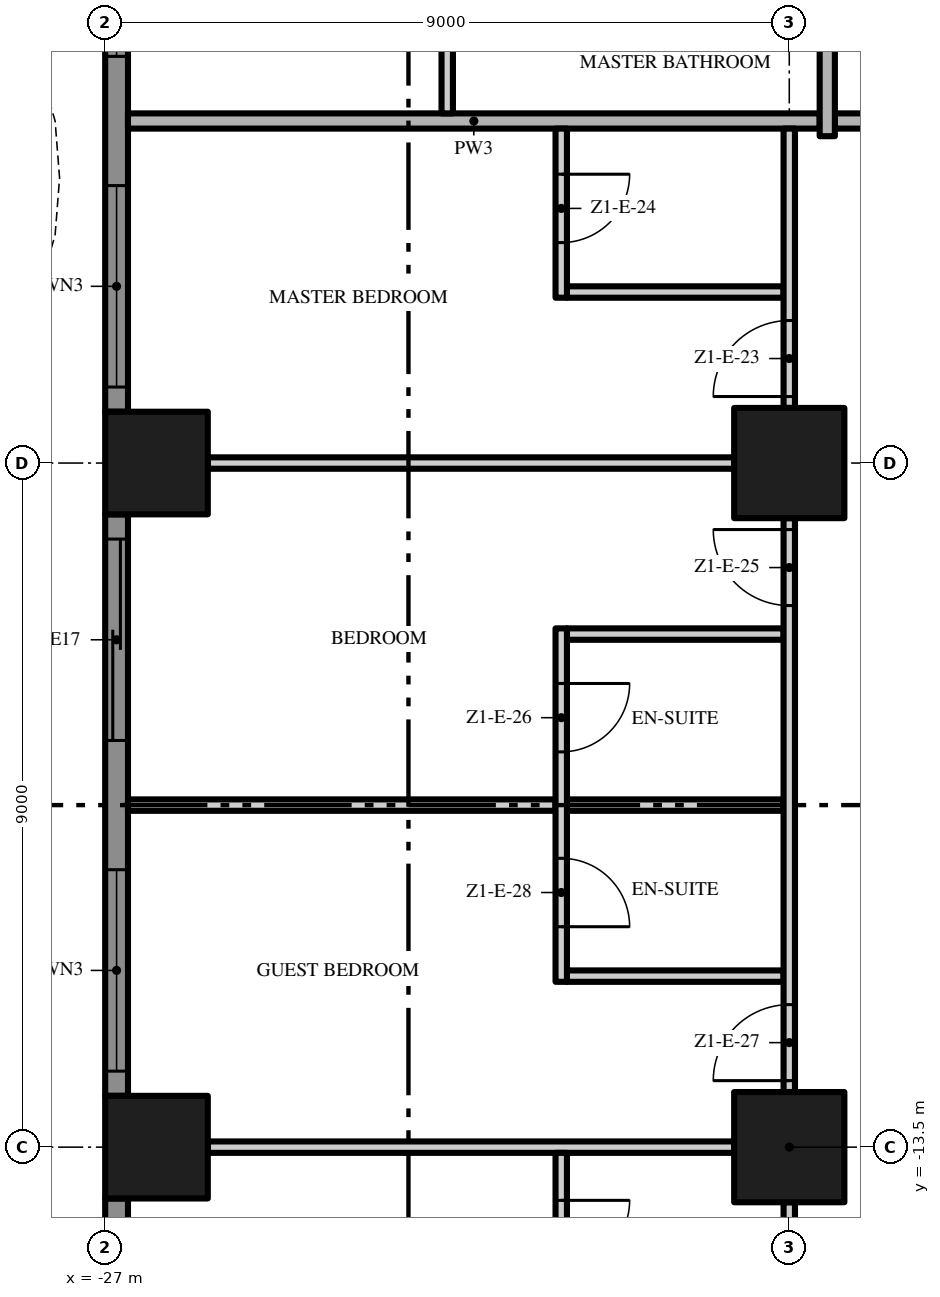
"""IFC4 building model, lengths in metres.
Left out: names, types, materials, properties, quantities, classifications, styles, units other than length and angle.
Written with IfcOpenShell. Run it as: python <this file> out.ifc"""

import sys

from ifc_helpers import new_model, si_unit, direction, frame, frame_2d, origin, origin_2d, place, context, subcontext, project, spatial, polyline, rectangle, outline, extrude, element, fill, save


model = new_model("IFC4")
c1 = context("Model", 3, precision=1e-05, world=origin(), true_north=direction((0.0, 1.0)))
c2 = subcontext(c1, "Body", "Model", "MODEL_VIEW")
j1 = project(units=[si_unit("LENGTHUNIT", "METRE"), si_unit("PLANEANGLEUNIT", "RADIAN")], contexts=[c1])
p1 = place(None, origin())
s1 = spatial("IfcSite", under=j1, at=p1, CompositionType="ELEMENT")
p2 = place(p1, origin())
s2 = spatial("IfcBuilding", under=s1, at=p2, CompositionType="ELEMENT")
p3 = place(p2, frame((0.0, 0.0, 60.6)))
s3 = spatial("IfcBuildingStorey", under=s2, at=p3, CompositionType="ELEMENT", Elevation=60.6)
for number, where, z_axis, x_axis in (
    (1, (-18.0, -13.5, 0.0), (0.0, 0.0, 1.0), (1.0, 0.0, 0.0)),
    (2, (-18.0, -4.5, 0.0), (0.0, 0.0, 1.0), (1.0, 0.0, 0.0)),
):
    element("IfcColumn", number, at=place(p3, frame(where, z_axis=z_axis, x_axis=x_axis)), inside=s3, PredefinedType="COLUMN", context=c2, shape_type="SweptSolid", body=[
        extrude(rectangle(XDim=1.45, YDim=1.45, at=origin_2d()), origin(), (0.0, 0.0, 1.0), 3.5),
    ])
for number, where, z_axis, x_axis in (
    (3, (-26.325, -13.5, 0.0), (0.0, 0.0, 1.0), (1.0, 0.0, 0.0)),
    (4, (-26.325, -4.5, 0.0), (0.0, 0.0, 1.0), (1.0, 0.0, 0.0)),
):
    element("IfcColumn", number, at=place(p3, frame(where, z_axis=z_axis, x_axis=x_axis)), inside=s3, PredefinedType="COLUMN", context=c2, shape_type="SweptSolid", body=[
        extrude(rectangle(XDim=1.35, YDim=1.35, at=origin_2d()), origin(), (0.0, 0.0, 1.0), 3.5),
    ])
p4 = place(p3, frame((-26.85, -3.825, 0.0), z_axis=(0.0, 0.0, 1.0), x_axis=(0.0, 1.0, 0.0)))
e5 = element("IfcWall", 5, at=p4, inside=s3, PredefinedType="SOLIDWALL", context=c2, shape_type="SweptSolid", body=[
    extrude(rectangle(XDim=7.65, YDim=0.3, at=frame_2d((3.825, 0.0))), origin(), (0.0, 0.0, 1.0), 3.5),
])
p5 = place(p4, frame((4.675, 0.0, 0.45)))
e6 = element("IfcOpeningElement", 6, at=p5, cuts=e5, PredefinedType="OPENING", context=c2, shape_type="SweptSolid", body=[
    extrude(rectangle(XDim=2.65, YDim=2.65, at=frame_2d((1.325, 1.325))), frame((0.0, 0.16, 0.0), z_axis=(0.0, -1.0, 0.0), x_axis=(1.0, 0.0, 0.0)), (0.0, 0.0, 1.0), 0.32),
])
p6 = place(p4, frame((0.325, 0.0, 0.45)))
e7 = element("IfcOpeningElement", 7, at=p6, cuts=e5, PredefinedType="OPENING", context=c2, shape_type="SweptSolid", body=[
    extrude(rectangle(XDim=2.65, YDim=2.65, at=frame_2d((1.325, 1.325))), frame((0.0, 0.16, 0.0), z_axis=(0.0, -1.0, 0.0), x_axis=(1.0, 0.0, 0.0)), (0.0, 0.0, 1.0), 0.32),
])
p7 = place(p3, frame((-26.85, -12.825, 0.0), z_axis=(0.0, 0.0, 1.0), x_axis=(0.0, 1.0, 0.0)))
e8 = element("IfcWall", 8, at=p7, inside=s3, PredefinedType="SOLIDWALL", context=c2, shape_type="SweptSolid", body=[
    extrude(rectangle(XDim=7.65, YDim=0.3, at=frame_2d((3.825, 0.0))), origin(), (0.0, 0.0, 1.0), 3.5),
])
p8 = place(p7, frame((4.675, 0.0, 0.0)))
e9 = element("IfcOpeningElement", 9, at=p8, cuts=e8, PredefinedType="OPENING", context=c2, shape_type="SweptSolid", body=[
    extrude(rectangle(XDim=2.65, YDim=2.4, at=frame_2d((1.325, 1.2))), frame((0.0, 0.16, 0.0), z_axis=(0.0, -1.0, 0.0), x_axis=(1.0, 0.0, 0.0)), (0.0, 0.0, 1.0), 0.32),
])
p9 = place(p7, frame((0.325, 0.0, 0.45)))
e10 = element("IfcOpeningElement", 10, at=p9, cuts=e8, PredefinedType="OPENING", context=c2, shape_type="SweptSolid", body=[
    extrude(rectangle(XDim=2.65, YDim=2.65, at=frame_2d((1.325, 1.325))), frame((0.0, 0.16, 0.0), z_axis=(0.0, -1.0, 0.0), x_axis=(1.0, 0.0, 0.0)), (0.0, 0.0, 1.0), 0.32),
])
p10 = place(p3, frame((-26.85, -18.0, 0.0), z_axis=(0.0, 0.0, 1.0), x_axis=(0.0, 1.0, 0.0)))
e11 = element("IfcWall", 11, at=p10, inside=s3, PredefinedType="SOLIDWALL", context=c2, shape_type="SweptSolid", body=[
    extrude(rectangle(XDim=3.825, YDim=0.3, at=frame_2d((1.913, 0.0))), origin(), (0.0, 0.0, 1.0), 3.5),
])
p11 = place(p10, frame((0.85, 0.0, 0.45)))
e12 = element("IfcOpeningElement", 12, at=p11, cuts=e11, PredefinedType="OPENING", context=c2, shape_type="SweptSolid", body=[
    extrude(rectangle(XDim=2.65, YDim=2.65, at=frame_2d((1.325, 1.325))), frame((0.0, 0.16, 0.0), z_axis=(0.0, -1.0, 0.0), x_axis=(1.0, 0.0, 0.0)), (0.0, 0.0, 1.0), 0.32),
])
p12 = place(p3, origin())
e13 = element("IfcWall", 13, at=p12, inside=s3, PredefinedType="USERDEFINED", context=c2, shape_type="SweptSolid", body=[
    extrude(outline(polyline([(-28.8, 18.0), (-28.095, 16.5), (-27.659, 15.0), (-27.6, 14.25), (-27.659, 13.5), (-28.095, 12.0), (-28.8, 10.5), (-29.505, 9.0), (-29.941, 7.5), (-30.0, 6.75), (-29.941, 6.0), (-29.505, 4.5), (-28.8, 3.0), (-28.095, 1.5), (-27.659, 0.0), (-27.6, -0.75), (-27.659, -1.5), (-28.095, -3.0), (-28.8, -4.5), (-29.505, -6.0), (-29.941, -7.5), (-30.0, -8.25), (-29.941, -9.0), (-29.505, -10.5), (-28.8, -12.0), (-28.095, -13.5), (-27.659, -15.0), (-27.6, -15.75), (-27.659, -16.5), (-28.095, -18.0), (-27.855, -18.07), (-27.411, -16.545), (-27.349, -15.75), (-27.411, -14.955), (-27.86, -13.411), (-28.574, -11.894), (-29.271, -10.411), (-29.694, -8.955), (-29.749, -8.25), (-29.694, -7.545), (-29.271, -6.089), (-28.574, -4.606), (-27.86, -3.089), (-27.411, -1.545), (-27.349, -0.75), (-27.411, 0.045), (-27.86, 1.589), (-28.574, 3.106), (-29.271, 4.589), (-29.694, 6.045), (-29.749, 6.75), (-29.694, 7.455), (-29.271, 8.911), (-28.574, 10.394), (-27.86, 11.911), (-27.411, 13.455), (-27.349, 14.25), (-27.411, 15.045), (-27.86, 16.589), (-28.574, 18.106), (-28.8, 18.0)])), origin(), (0.0, 0.0, 1.0), 0.9),
])
p13 = place(p3, frame((-25.65, -13.5, 0.0), z_axis=(0.0, 0.0, 1.0), x_axis=(1.0, 0.0, 0.0)))
e14 = element("IfcWall", 14, at=p13, inside=s3, PredefinedType="PARTITIONING", context=c2, shape_type="SweptSolid", body=[
    extrude(rectangle(XDim=6.925, YDim=0.15, at=frame_2d((3.462, 0.0))), origin(), (0.0, 0.0, 1.0), 3.5),
])
p14 = place(p3, frame((-20.925, -11.25, 0.0), z_axis=(0.0, 0.0, 1.0), x_axis=(1.0, 0.0, 0.0)))
e15 = element("IfcWall", 15, at=p14, inside=s3, PredefinedType="PARTITIONING", context=c2, shape_type="SweptSolid", body=[
    extrude(rectangle(XDim=2.85, YDim=0.15, at=frame_2d((1.425, 0.0))), origin(), (0.0, 0.0, 1.0), 3.5),
])
p15 = place(p3, frame((-26.7, -9.0, 0.0), z_axis=(0.0, 0.0, 1.0), x_axis=(1.0, 0.0, 0.0)))
e16 = element("IfcWall", 16, at=p15, inside=s3, PredefinedType="PARTITIONING", context=c2, shape_type="SweptSolid", body=[
    extrude(rectangle(XDim=5.625, YDim=0.15, at=frame_2d((2.812, 0.0))), origin(), (0.0, 0.0, 1.0), 3.5),
])
for number, where, z_axis, x_axis in (
    (17, (-20.925, -9.0, 0.0), (0.0, 0.0, 1.0), (1.0, 0.0, 0.0)),
    (18, (-20.925, -6.75, 0.0), (0.0, 0.0, 1.0), (1.0, 0.0, 0.0)),
):
    element("IfcWall", number, at=place(p3, frame(where, z_axis=z_axis, x_axis=x_axis)), inside=s3, PredefinedType="PARTITIONING", context=c2, shape_type="SweptSolid", body=[
        extrude(rectangle(XDim=2.85, YDim=0.15, at=frame_2d((1.425, 0.0))), origin(), (0.0, 0.0, 1.0), 3.5),
    ])
p16 = place(p3, frame((-25.65, -4.5, 0.0), z_axis=(0.0, 0.0, 1.0), x_axis=(1.0, 0.0, 0.0)))
e19 = element("IfcWall", 19, at=p16, inside=s3, PredefinedType="PARTITIONING", context=c2, shape_type="SweptSolid", body=[
    extrude(rectangle(XDim=6.925, YDim=0.15, at=frame_2d((3.462, 0.0))), origin(), (0.0, 0.0, 1.0), 3.5),
])
p17 = place(p3, frame((-20.925, -2.25, 0.0), z_axis=(0.0, 0.0, 1.0), x_axis=(1.0, 0.0, 0.0)))
e20 = element("IfcWall", 20, at=p17, inside=s3, PredefinedType="PARTITIONING", context=c2, shape_type="SweptSolid", body=[
    extrude(rectangle(XDim=2.85, YDim=0.15, at=frame_2d((1.425, 0.0))), origin(), (0.0, 0.0, 1.0), 3.5),
])
p18 = place(p3, frame((-17.4, 0.0, 0.0), z_axis=(0.0, 0.0, 1.0), x_axis=(1.0, 0.0, 0.0)))
e21 = element("IfcWall", 21, at=p18, inside=s3, PredefinedType="PARTITIONING", context=c2, shape_type="SweptSolid", body=[
    extrude(rectangle(XDim=12.8, YDim=0.2, at=frame_2d((6.4, 0.0))), origin(), (0.0, 0.0, 1.0), 3.5),
])
p19 = place(p3, frame((-26.7, 0.0, 0.0), z_axis=(0.0, 0.0, 1.0), x_axis=(1.0, 0.0, 0.0)))
e22 = element("IfcWall", 22, at=p19, inside=s3, PredefinedType="PARTITIONING", context=c2, shape_type="SweptSolid", body=[
    extrude(rectangle(XDim=9.1, YDim=0.2, at=frame_2d((4.55, 0.0))), origin(), (0.0, 0.0, 1.0), 3.5),
])
p20 = place(p3, frame((-22.5, 0.1, 0.0), z_axis=(0.0, 0.0, 1.0), x_axis=(0.0, 1.0, 0.0)))
e23 = element("IfcWall", 23, at=p20, inside=s3, PredefinedType="PARTITIONING", context=c2, shape_type="SweptSolid", body=[
    extrude(rectangle(XDim=17.225, YDim=0.15, at=frame_2d((8.613, 0.0))), origin(), (0.0, 0.0, 1.0), 3.5),
])
p21 = place(p20, frame((1.65, 0.0, 0.0)))
e24 = element("IfcOpeningElement", 24, at=p21, cuts=e23, PredefinedType="OPENING", context=c2, shape_type="SweptSolid", body=[
    extrude(rectangle(XDim=1.0, YDim=2.4, at=frame_2d((0.5, 1.2))), frame((0.0, 0.085, 0.0), z_axis=(0.0, -1.0, 0.0), x_axis=(1.0, 0.0, 0.0)), (0.0, 0.0, 1.0), 0.17),
])
p22 = place(p20, frame((5.0, 0.0, 0.0)))
e25 = element("IfcOpeningElement", 25, at=p22, cuts=e23, PredefinedType="OPENING", context=c2, shape_type="SweptSolid", body=[
    extrude(rectangle(XDim=1.0, YDim=2.4, at=frame_2d((0.5, 1.2))), frame((0.0, 0.085, 0.0), z_axis=(0.0, -1.0, 0.0), x_axis=(1.0, 0.0, 0.0)), (0.0, 0.0, 1.0), 0.17),
])
p23 = place(p20, frame((13.25, 0.0, 0.0)))
e26 = element("IfcOpeningElement", 26, at=p23, cuts=e23, PredefinedType="OPENING", context=c2, shape_type="SweptSolid", body=[
    extrude(rectangle(XDim=1.8, YDim=2.4, at=frame_2d((0.9, 1.2))), frame((0.0, 0.085, 0.0), z_axis=(0.0, -1.0, 0.0), x_axis=(1.0, 0.0, 0.0)), (0.0, 0.0, 1.0), 0.17),
])
p24 = place(p3, frame((-21.0, -13.575, 0.0), z_axis=(0.0, 0.0, 1.0), x_axis=(0.0, -1.0, 0.0)))
e27 = element("IfcWall", 27, at=p24, inside=s3, PredefinedType="PARTITIONING", context=c2, shape_type="SweptSolid", body=[
    extrude(rectangle(XDim=2.25, YDim=0.15, at=frame_2d((1.125, 0.0))), origin(), (0.0, 0.0, 1.0), 3.5),
])
p25 = place(p24, frame((0.625, 0.0, 0.0)))
e28 = element("IfcOpeningElement", 28, at=p25, cuts=e27, PredefinedType="OPENING", context=c2, shape_type="SweptSolid", body=[
    extrude(rectangle(XDim=0.9, YDim=2.1, at=frame_2d((0.45, 1.05))), frame((0.0, 0.085, 0.0), z_axis=(0.0, -1.0, 0.0), x_axis=(1.0, 0.0, 0.0)), (0.0, 0.0, 1.0), 0.17),
])
p26 = place(p3, frame((-21.0, -6.675, 0.0), z_axis=(0.0, 0.0, 1.0), x_axis=(0.0, -1.0, 0.0)))
e29 = element("IfcWall", 29, at=p26, inside=s3, PredefinedType="PARTITIONING", context=c2, shape_type="SweptSolid", body=[
    extrude(rectangle(XDim=4.65, YDim=0.15, at=frame_2d((2.325, 0.0))), origin(), (0.0, 0.0, 1.0), 3.5),
])
p27 = place(p26, frame((0.725, 0.0, 0.0)))
e30 = element("IfcOpeningElement", 30, at=p27, cuts=e29, PredefinedType="OPENING", context=c2, shape_type="SweptSolid", body=[
    extrude(rectangle(XDim=0.9, YDim=2.1, at=frame_2d((0.45, 1.05))), frame((0.0, 0.085, 0.0), z_axis=(0.0, -1.0, 0.0), x_axis=(1.0, 0.0, 0.0)), (0.0, 0.0, 1.0), 0.17),
])
p28 = place(p26, frame((3.025, 0.0, 0.0)))
e31 = element("IfcOpeningElement", 31, at=p28, cuts=e29, PredefinedType="OPENING", context=c2, shape_type="SweptSolid", body=[
    extrude(rectangle(XDim=0.9, YDim=2.1, at=frame_2d((0.45, 1.05))), frame((0.0, 0.085, 0.0), z_axis=(0.0, -1.0, 0.0), x_axis=(1.0, 0.0, 0.0)), (0.0, 0.0, 1.0), 0.17),
])
p29 = place(p3, frame((-21.0, -0.1, 0.0), z_axis=(0.0, 0.0, 1.0), x_axis=(0.0, -1.0, 0.0)))
e32 = element("IfcWall", 32, at=p29, inside=s3, PredefinedType="PARTITIONING", context=c2, shape_type="SweptSolid", body=[
    extrude(rectangle(XDim=2.225, YDim=0.15, at=frame_2d((1.113, 0.0))), origin(), (0.0, 0.0, 1.0), 3.5),
])
p30 = place(p29, frame((0.6, 0.0, 0.0)))
e33 = element("IfcOpeningElement", 33, at=p30, cuts=e32, PredefinedType="OPENING", context=c2, shape_type="SweptSolid", body=[
    extrude(rectangle(XDim=0.9, YDim=2.1, at=frame_2d((0.45, 1.05))), frame((0.0, 0.085, 0.0), z_axis=(0.0, -1.0, 0.0), x_axis=(1.0, 0.0, 0.0)), (0.0, 0.0, 1.0), 0.17),
])
p31 = place(p3, frame((-18.0, -21.15, 0.0), z_axis=(0.0, 0.0, 1.0), x_axis=(0.0, 1.0, 0.0)))
e34 = element("IfcWall", 34, at=p31, inside=s3, PredefinedType="PARTITIONING", context=c2, shape_type="SweptSolid", body=[
    extrude(rectangle(XDim=6.925, YDim=0.15, at=frame_2d((3.462, 0.0))), origin(), (0.0, 0.0, 1.0), 3.5),
])
p32 = place(p31, frame((1.1, 0.0, 0.0)))
e35 = element("IfcOpeningElement", 35, at=p32, cuts=e34, PredefinedType="OPENING", context=c2, shape_type="SweptSolid", body=[
    extrude(rectangle(XDim=1.8, YDim=2.4, at=frame_2d((0.9, 1.2))), frame((0.0, 0.085, 0.0), z_axis=(0.0, -1.0, 0.0), x_axis=(1.0, 0.0, 0.0)), (0.0, 0.0, 1.0), 0.17),
])
p33 = place(p3, frame((-18.0, -12.775, 0.0), z_axis=(0.0, 0.0, 1.0), x_axis=(0.0, 1.0, 0.0)))
e36 = element("IfcWall", 36, at=p33, inside=s3, PredefinedType="PARTITIONING", context=c2, shape_type="SweptSolid", body=[
    extrude(rectangle(XDim=7.55, YDim=0.15, at=frame_2d((3.775, 0.0))), origin(), (0.0, 0.0, 1.0), 3.5),
])
p34 = place(p33, frame((6.4, 0.0, 0.0)))
e37 = element("IfcOpeningElement", 37, at=p34, cuts=e36, PredefinedType="OPENING", context=c2, shape_type="SweptSolid", body=[
    extrude(rectangle(XDim=1.0, YDim=2.4, at=frame_2d((0.5, 1.2))), frame((0.0, 0.085, 0.0), z_axis=(0.0, -1.0, 0.0), x_axis=(1.0, 0.0, 0.0)), (0.0, 0.0, 1.0), 0.17),
])
p35 = place(p33, frame((0.15, 0.0, 0.0)))
e38 = element("IfcOpeningElement", 38, at=p35, cuts=e36, PredefinedType="OPENING", context=c2, shape_type="SweptSolid", body=[
    extrude(rectangle(XDim=1.0, YDim=2.4, at=frame_2d((0.5, 1.2))), frame((0.0, 0.085, 0.0), z_axis=(0.0, -1.0, 0.0), x_axis=(1.0, 0.0, 0.0)), (0.0, 0.0, 1.0), 0.17),
])
p36 = place(p3, frame((-18.0, -3.775, 0.0), z_axis=(0.0, 0.0, 1.0), x_axis=(0.0, 1.0, 0.0)))
e39 = element("IfcWall", 39, at=p36, inside=s3, PredefinedType="PARTITIONING", context=c2, shape_type="SweptSolid", body=[
    extrude(rectangle(XDim=3.675, YDim=0.15, at=frame_2d((1.837, 0.0))), origin(), (0.0, 0.0, 1.0), 3.5),
])
p37 = place(p36, frame((0.15, 0.0, 0.0)))
e40 = element("IfcOpeningElement", 40, at=p37, cuts=e39, PredefinedType="OPENING", context=c2, shape_type="SweptSolid", body=[
    extrude(rectangle(XDim=1.0, YDim=2.4, at=frame_2d((0.5, 1.2))), frame((0.0, 0.085, 0.0), z_axis=(0.0, -1.0, 0.0), x_axis=(1.0, 0.0, 0.0)), (0.0, 0.0, 1.0), 0.17),
])
p38 = place(p3, frame((-17.5, -0.2, 0.0), z_axis=(0.0, 0.0, 1.0), x_axis=(0.0, 1.0, 0.0)))
e41 = element("IfcWall", 41, at=p38, inside=s3, PredefinedType="PARTITIONING", context=c2, shape_type="SweptSolid", body=[
    extrude(rectangle(XDim=3.975, YDim=0.2, at=frame_2d((1.988, 0.0))), origin(), (0.0, 0.0, 1.0), 3.5),
])
p39 = place(p5, origin())
e42 = element("IfcWindow", 42, at=p39, inside=s3, PartitioningType="SINGLE_PANEL", PredefinedType="WINDOW", context=c2, shape_type="SweptSolid", body=[
    extrude(rectangle(XDim=2.65, YDim=2.65, at=frame_2d((1.325, 1.325))), frame((0.0, 0.03, 0.0), z_axis=(0.0, -1.0, 0.0), x_axis=(1.0, 0.0, 0.0)), (0.0, 0.0, 1.0), 0.06),
])
fill(e6, e42)
p40 = place(p6, origin())
e43 = element("IfcWindow", 43, at=p40, inside=s3, PartitioningType="SINGLE_PANEL", PredefinedType="WINDOW", context=c2, shape_type="SweptSolid", body=[
    extrude(rectangle(XDim=2.65, YDim=2.65, at=frame_2d((1.325, 1.325))), frame((0.0, 0.03, 0.0), z_axis=(0.0, -1.0, 0.0), x_axis=(1.0, 0.0, 0.0)), (0.0, 0.0, 1.0), 0.06),
])
fill(e7, e43)
p41 = place(p8, origin())
e44 = element("IfcDoor", 44, at=p41, inside=s3, OperationType="SINGLE_SWING_LEFT", PredefinedType="DOOR", context=c2, shape_type="SweptSolid", body=[
    extrude(rectangle(XDim=2.65, YDim=2.4, at=frame_2d((1.325, 1.2))), frame((0.0, 0.025, 0.0), z_axis=(0.0, -1.0, 0.0), x_axis=(1.0, 0.0, 0.0)), (0.0, 0.0, 1.0), 0.05),
])
fill(e9, e44)
p42 = place(p9, origin())
e45 = element("IfcWindow", 45, at=p42, inside=s3, PartitioningType="SINGLE_PANEL", PredefinedType="WINDOW", context=c2, shape_type="SweptSolid", body=[
    extrude(rectangle(XDim=2.65, YDim=2.65, at=frame_2d((1.325, 1.325))), frame((0.0, 0.03, 0.0), z_axis=(0.0, -1.0, 0.0), x_axis=(1.0, 0.0, 0.0)), (0.0, 0.0, 1.0), 0.06),
])
fill(e10, e45)
p43 = place(p37, origin())
e46 = element("IfcDoor", 46, at=p43, inside=s3, OperationType="SINGLE_SWING_LEFT", PredefinedType="DOOR", context=c2, shape_type="SweptSolid", body=[
    extrude(rectangle(XDim=1.0, YDim=2.4, at=frame_2d((0.5, 1.2))), frame((0.0, 0.025, 0.0), z_axis=(0.0, -1.0, 0.0), x_axis=(1.0, 0.0, 0.0)), (0.0, 0.0, 1.0), 0.05),
])
fill(e40, e46)
p44 = place(p30, origin())
e47 = element("IfcDoor", 47, at=p44, inside=s3, OperationType="SINGLE_SWING_LEFT", PredefinedType="DOOR", context=c2, shape_type="SweptSolid", body=[
    extrude(rectangle(XDim=0.9, YDim=2.1, at=frame_2d((0.45, 1.05))), frame((0.0, 0.025, 0.0), z_axis=(0.0, -1.0, 0.0), x_axis=(1.0, 0.0, 0.0)), (0.0, 0.0, 1.0), 0.05),
])
fill(e33, e47)
p45 = place(p34, origin())
e48 = element("IfcDoor", 48, at=p45, inside=s3, OperationType="SINGLE_SWING_RIGHT", PredefinedType="DOOR", context=c2, shape_type="SweptSolid", body=[
    extrude(rectangle(XDim=1.0, YDim=2.4, at=frame_2d((0.5, 1.2))), frame((0.0, 0.025, 0.0), z_axis=(0.0, -1.0, 0.0), x_axis=(1.0, 0.0, 0.0)), (0.0, 0.0, 1.0), 0.05),
])
fill(e37, e48)
p46 = place(p27, origin())
e49 = element("IfcDoor", 49, at=p46, inside=s3, OperationType="SINGLE_SWING_LEFT", PredefinedType="DOOR", context=c2, shape_type="SweptSolid", body=[
    extrude(rectangle(XDim=0.9, YDim=2.1, at=frame_2d((0.45, 1.05))), frame((0.0, 0.025, 0.0), z_axis=(0.0, -1.0, 0.0), x_axis=(1.0, 0.0, 0.0)), (0.0, 0.0, 1.0), 0.05),
])
fill(e30, e49)
p47 = place(p35, origin())
e50 = element("IfcDoor", 50, at=p47, inside=s3, OperationType="SINGLE_SWING_LEFT", PredefinedType="DOOR", context=c2, shape_type="SweptSolid", body=[
    extrude(rectangle(XDim=1.0, YDim=2.4, at=frame_2d((0.5, 1.2))), frame((0.0, 0.025, 0.0), z_axis=(0.0, -1.0, 0.0), x_axis=(1.0, 0.0, 0.0)), (0.0, 0.0, 1.0), 0.05),
])
fill(e38, e50)
p48 = place(p28, origin())
e51 = element("IfcDoor", 51, at=p48, inside=s3, OperationType="SINGLE_SWING_RIGHT", PredefinedType="DOOR", context=c2, shape_type="SweptSolid", body=[
    extrude(rectangle(XDim=0.9, YDim=2.1, at=frame_2d((0.45, 1.05))), frame((0.0, 0.025, 0.0), z_axis=(0.0, -1.0, 0.0), x_axis=(1.0, 0.0, 0.0)), (0.0, 0.0, 1.0), 0.05),
])
fill(e31, e51)
p49 = place(p25, origin())
e52 = element("IfcDoor", 52, at=p49, inside=s3, OperationType="SINGLE_SWING_LEFT", PredefinedType="DOOR", context=c2, shape_type="SweptSolid", body=[
    extrude(rectangle(XDim=0.9, YDim=2.1, at=frame_2d((0.45, 1.05))), frame((0.0, 0.025, 0.0), z_axis=(0.0, -1.0, 0.0), x_axis=(1.0, 0.0, 0.0)), (0.0, 0.0, 1.0), 0.05),
])
fill(e28, e52)
save(model, sys.argv[1])
